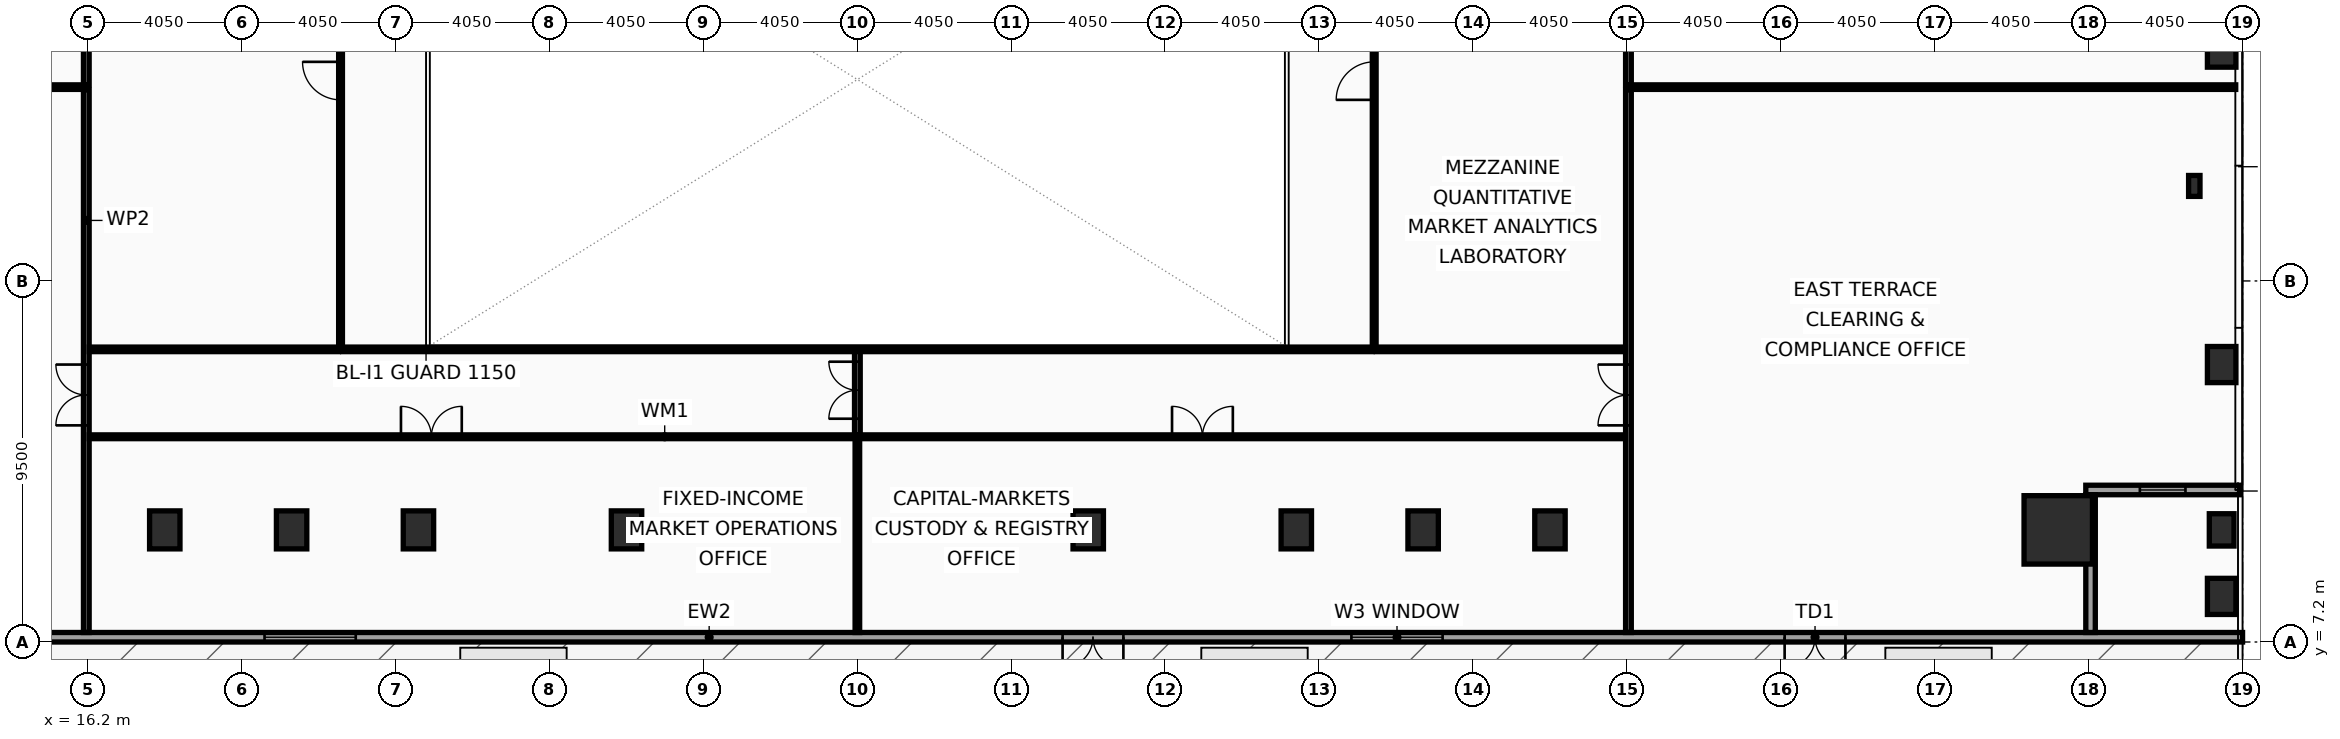
"""IFC4 building model, lengths in metres.
Left out: names, types, materials, properties, quantities, classifications, styles, units other than length and angle.
Written with IfcOpenShell. Run it as: python <this file> out.ifc"""

import sys

from ifc_helpers import new_model, si_unit, direction, frame, frame_2d, origin, origin_2d, place, context, subcontext, project, spatial, rectangle, hollow_rectangle, i_section, extrude, element, fill, save


model = new_model("IFC4")
c1 = context("Model", 3, precision=1e-05, world=origin(), true_north=direction((0.0, 1.0)))
c2 = subcontext(c1, "Body", "Model", "MODEL_VIEW")
j1 = project(units=[si_unit("LENGTHUNIT", "METRE"), si_unit("PLANEANGLEUNIT", "RADIAN")], contexts=[c1])
p1 = place(None, origin())
s1 = spatial("IfcSite", under=j1, at=p1, CompositionType="ELEMENT")
p2 = place(p1, origin())
s2 = spatial("IfcBuilding", under=s1, at=p2, CompositionType="ELEMENT")
p3 = place(p2, frame((0.0, 0.0, 15.4)))
s3 = spatial("IfcBuildingStorey", under=s2, at=p3, CompositionType="ELEMENT", Elevation=15.4)
p4 = place(p3, frame((68.05, 10.15, 0.0), z_axis=(0.0, 0.0, 1.0), x_axis=(1.0, 0.0, 0.0)))
e1 = element("IfcColumn", 1, at=p4, inside=s3, PredefinedType="COLUMN", context=c2, shape_type="SweptSolid", body=[
    extrude(hollow_rectangle(XDim=1.8, YDim=1.8, WallThickness=0.08, at=origin_2d()), origin(), (0.0, 0.0, 1.0), 5.0),
])
for number, where, z_axis, x_axis in (
    (2, (18.225, 10.15, 0.0), (0.0, 0.0, 1.0), (1.0, 0.0, 0.0)),
    (3, (21.562, 10.15, 0.0), (0.0, 0.0, 1.0), (1.0, 0.0, 0.0)),
    (4, (24.9, 10.15, 0.0), (0.0, 0.0, 1.0), (1.0, 0.0, 0.0)),
    (5, (30.375, 10.15, 0.0), (0.0, 0.0, 1.0), (1.0, 0.0, 0.0)),
    (6, (42.525, 10.15, 0.0), (0.0, 0.0, 1.0), (1.0, 0.0, 0.0)),
    (7, (48.0, 10.15, 0.0), (0.0, 0.0, 1.0), (1.0, 0.0, 0.0)),
    (8, (51.337, 10.15, 0.0), (0.0, 0.0, 1.0), (1.0, 0.0, 0.0)),
    (9, (54.675, 10.15, 0.0), (0.0, 0.0, 1.0), (1.0, 0.0, 0.0)),
):
    element("IfcColumn", number, at=place(p3, frame(where, z_axis=z_axis, x_axis=x_axis)), inside=s3, PredefinedType="COLUMN", context=c2, shape_type="SweptSolid", body=[
        extrude(hollow_rectangle(XDim=0.8, YDim=1.0, WallThickness=0.055, at=origin_2d()), origin(), (0.0, 0.0, 1.0), 5.0),
    ])
p5 = place(p3, frame((71.63, 19.2, 0.0), z_axis=(0.0, 0.0, 1.0), x_axis=(1.0, 0.0, 0.0)))
e10 = element("IfcColumn", 10, at=p5, inside=s3, PredefinedType="COLUMN", context=c2, shape_type="SweptSolid", body=[
    extrude(i_section(OverallWidth=0.3, OverallDepth=0.55, WebThickness=0.015, FlangeThickness=0.029, at=origin_2d()), origin(), (0.0, 0.0, 1.0), 5.0),
])
p6 = place(p3, frame((72.35, 8.4, 0.0), z_axis=(0.0, 0.0, 1.0), x_axis=(1.0, 0.0, 0.0)))
e11 = element("IfcColumn", 11, at=p6, inside=s3, PredefinedType="PILASTER", context=c2, shape_type="SweptSolid", body=[
    extrude(rectangle(XDim=0.75, YDim=0.95, at=origin_2d()), origin(), (0.0, 0.0, 1.0), 5.0),
])
p7 = place(p3, frame((72.35, 10.15, 0.0), z_axis=(0.0, 0.0, 1.0), x_axis=(1.0, 0.0, 0.0)))
e12 = element("IfcColumn", 12, at=p7, inside=s3, PredefinedType="PILASTER", context=c2, shape_type="SweptSolid", body=[
    extrude(rectangle(XDim=0.65, YDim=0.85, at=origin_2d()), origin(), (0.0, 0.0, 1.0), 5.0),
])
for number, where, z_axis, x_axis in (
    (13, (72.35, 14.5, 0.0), (0.0, 0.0, 1.0), (1.0, 0.0, 0.0)),
    (14, (72.35, 22.8, 0.0), (0.0, 0.0, 1.0), (1.0, 0.0, 0.0)),
):
    element("IfcColumn", number, at=place(p3, frame(where, z_axis=z_axis, x_axis=x_axis)), inside=s3, PredefinedType="PILASTER", context=c2, shape_type="SweptSolid", body=[
        extrude(rectangle(XDim=0.75, YDim=0.95, at=origin_2d()), origin(), (0.0, 0.0, 1.0), 5.0),
    ])
p8 = place(p3, frame((72.9, 7.325, 0.0), z_axis=(0.0, 0.0, 1.0), x_axis=(-1.0, 0.0, 0.0)))
e15 = element("IfcWall", 15, at=p8, inside=s3, PredefinedType="SOLIDWALL", context=c2, shape_type="SweptSolid", body=[
    extrude(rectangle(XDim=72.9, YDim=0.25, at=frame_2d((36.45, 0.0))), origin(), (0.0, 0.0, 1.0), 3.87),
])
p9 = place(p8, frame((10.45, 0.0, 0.0)))
e16 = element("IfcOpeningElement", 16, at=p9, cuts=e15, PredefinedType="OPENING", context=c2, shape_type="SweptSolid", body=[
    extrude(rectangle(XDim=1.6, YDim=2.2, at=frame_2d((0.8, 1.1))), frame((0.0, 0.135, 0.0), z_axis=(0.0, -1.0, 0.0), x_axis=(1.0, 0.0, 0.0)), (0.0, 0.0, 1.0), 0.27),
])
p10 = place(p8, frame((29.45, 0.0, 0.0)))
e17 = element("IfcOpeningElement", 17, at=p10, cuts=e15, PredefinedType="OPENING", context=c2, shape_type="SweptSolid", body=[
    extrude(rectangle(XDim=1.6, YDim=2.2, at=frame_2d((0.8, 1.1))), frame((0.0, 0.135, 0.0), z_axis=(0.0, -1.0, 0.0), x_axis=(1.0, 0.0, 0.0)), (0.0, 0.0, 1.0), 0.27),
])
p11 = place(p8, frame((60.65, 0.0, 0.0)))
e18 = element("IfcOpeningElement", 18, at=p11, cuts=e15, PredefinedType="OPENING", context=c2, shape_type="SweptSolid", body=[
    extrude(rectangle(XDim=1.05, YDim=2.15, at=frame_2d((0.525, 1.075))), frame((0.0, 0.135, 0.0), z_axis=(0.0, -1.0, 0.0), x_axis=(1.0, 0.0, 0.0)), (0.0, 0.0, 1.0), 0.27),
])
p12 = place(p8, frame((21.05, 0.0, 0.85)))
e19 = element("IfcOpeningElement", 19, at=p12, cuts=e15, PredefinedType="OPENING", context=c2, shape_type="SweptSolid", body=[
    extrude(rectangle(XDim=2.4, YDim=2.6, at=frame_2d((1.2, 1.3))), frame((0.0, 0.135, 0.0), z_axis=(0.0, -1.0, 0.0), x_axis=(1.0, 0.0, 0.0)), (0.0, 0.0, 1.0), 0.27),
])
p13 = place(p8, frame((49.65, 0.0, 0.85)))
e20 = element("IfcOpeningElement", 20, at=p13, cuts=e15, PredefinedType="OPENING", context=c2, shape_type="SweptSolid", body=[
    extrude(rectangle(XDim=2.4, YDim=2.6, at=frame_2d((1.2, 1.3))), frame((0.0, 0.135, 0.0), z_axis=(0.0, -1.0, 0.0), x_axis=(1.0, 0.0, 0.0)), (0.0, 0.0, 1.0), 0.27),
])
p14 = place(p3, frame((72.82, 11.2, 0.0), z_axis=(0.0, 0.0, 1.0), x_axis=(-1.0, 0.0, 0.0)))
e21 = element("IfcWall", 21, at=p14, inside=s3, PredefinedType="SOLIDWALL", context=c2, shape_type="SweptSolid", body=[
    extrude(rectangle(XDim=4.045, YDim=0.25, at=frame_2d((2.022, 0.0))), origin(), (0.0, 0.0, 1.0), 4.12),
])
p15 = place(p14, frame((1.423, 0.0, 0.9)))
e22 = element("IfcOpeningElement", 22, at=p15, cuts=e21, PredefinedType="OPENING", context=c2, shape_type="SweptSolid", body=[
    extrude(rectangle(XDim=1.2, YDim=2.8, at=frame_2d((0.6, 1.4))), frame((0.0, 0.135, 0.0), z_axis=(0.0, -1.0, 0.0), x_axis=(1.0, 0.0, 0.0)), (0.0, 0.0, 1.0), 0.27),
])
p16 = place(p3, frame((68.9, 11.075, 0.0), z_axis=(0.0, 0.0, 1.0), x_axis=(0.0, -1.0, 0.0)))
e23 = element("IfcWall", 23, at=p16, inside=s3, PredefinedType="SOLIDWALL", context=c2, shape_type="SweptSolid", body=[
    extrude(rectangle(XDim=3.625, YDim=0.25, at=frame_2d((1.812, 0.0))), origin(), (0.0, 0.0, 1.0), 4.12),
])
p17 = place(p3, frame((16.16, 7.45, 0.0), z_axis=(0.0, 0.0, 1.0), x_axis=(0.0, 1.0, 0.0)))
e24 = element("IfcWall", 24, at=p17, inside=s3, PredefinedType="PARTITIONING", context=c2, shape_type="SweptSolid", body=[
    extrude(rectangle(XDim=14.285, YDim=0.15, at=frame_2d((7.143, 0.0))), origin(), (0.0, 0.0, 1.0), 3.87),
])
p18 = place(p17, frame((5.45, 0.0, 0.0)))
e25 = element("IfcOpeningElement", 25, at=p18, cuts=e24, PredefinedType="OPENING", context=c2, shape_type="SweptSolid", body=[
    extrude(rectangle(XDim=1.6, YDim=2.15, at=frame_2d((0.8, 1.075))), frame((0.0, 0.085, 0.0), z_axis=(0.0, -1.0, 0.0), x_axis=(1.0, 0.0, 0.0)), (0.0, 0.0, 1.0), 0.17),
])
p19 = place(p3, frame((16.16, 21.865, 0.0), z_axis=(0.0, 0.0, 1.0), x_axis=(0.0, 1.0, 0.0)))
e26 = element("IfcWall", 26, at=p19, inside=s3, PredefinedType="PARTITIONING", context=c2, shape_type="SweptSolid", body=[
    extrude(rectangle(XDim=13.77, YDim=0.15, at=frame_2d((6.885, 0.0))), origin(), (0.0, 0.0, 1.0), 3.87),
])
p20 = place(p19, frame((5.2, 0.0, 0.0)))
e27 = element("IfcOpeningElement", 27, at=p20, cuts=e26, PredefinedType="OPENING", context=c2, shape_type="SweptSolid", body=[
    extrude(rectangle(XDim=1.0, YDim=2.05, at=frame_2d((0.5, 1.025))), frame((0.0, 0.085, 0.0), z_axis=(0.0, -1.0, 0.0), x_axis=(1.0, 0.0, 0.0)), (0.0, 0.0, 1.0), 0.17),
])
p21 = place(p3, frame((0.18, 21.8, 0.0), z_axis=(0.0, 0.0, 1.0), x_axis=(1.0, 0.0, 0.0)))
e28 = element("IfcWall", 28, at=p21, inside=s3, PredefinedType="PARTITIONING", context=c2, shape_type="SweptSolid", body=[
    extrude(rectangle(XDim=15.9, YDim=0.12, at=frame_2d((7.95, 0.0))), origin(), (0.0, 0.0, 1.0), 4.12),
])
p22 = place(p3, frame((56.74, 7.45, 0.0), z_axis=(0.0, 0.0, 1.0), x_axis=(0.0, 1.0, 0.0)))
e29 = element("IfcWall", 29, at=p22, inside=s3, PredefinedType="PARTITIONING", context=c2, shape_type="SweptSolid", body=[
    extrude(rectangle(XDim=14.285, YDim=0.15, at=frame_2d((7.143, 0.0))), origin(), (0.0, 0.0, 1.0), 3.87),
])
p23 = place(p22, frame((5.45, 0.0, 0.0)))
e30 = element("IfcOpeningElement", 30, at=p23, cuts=e29, PredefinedType="OPENING", context=c2, shape_type="SweptSolid", body=[
    extrude(rectangle(XDim=1.6, YDim=2.15, at=frame_2d((0.8, 1.075))), frame((0.0, 0.085, 0.0), z_axis=(0.0, -1.0, 0.0), x_axis=(1.0, 0.0, 0.0)), (0.0, 0.0, 1.0), 0.17),
])
p24 = place(p3, frame((56.74, 21.865, 0.0), z_axis=(0.0, 0.0, 1.0), x_axis=(0.0, 1.0, 0.0)))
e31 = element("IfcWall", 31, at=p24, inside=s3, PredefinedType="PARTITIONING", context=c2, shape_type="SweptSolid", body=[
    extrude(rectangle(XDim=13.77, YDim=0.15, at=frame_2d((6.885, 0.0))), origin(), (0.0, 0.0, 1.0), 3.87),
])
p25 = place(p24, frame((5.2, 0.0, 0.0)))
e32 = element("IfcOpeningElement", 32, at=p25, cuts=e31, PredefinedType="OPENING", context=c2, shape_type="SweptSolid", body=[
    extrude(rectangle(XDim=1.0, YDim=2.05, at=frame_2d((0.5, 1.025))), frame((0.0, 0.085, 0.0), z_axis=(0.0, -1.0, 0.0), x_axis=(1.0, 0.0, 0.0)), (0.0, 0.0, 1.0), 0.17),
])
p26 = place(p3, frame((56.82, 21.8, 0.0), z_axis=(0.0, 0.0, 1.0), x_axis=(1.0, 0.0, 0.0)))
e33 = element("IfcWall", 33, at=p26, inside=s3, PredefinedType="PARTITIONING", context=c2, shape_type="SweptSolid", body=[
    extrude(rectangle(XDim=15.9, YDim=0.12, at=frame_2d((7.95, 0.0))), origin(), (0.0, 0.0, 1.0), 4.12),
])
p27 = place(p3, frame((16.24, 12.6, 0.0), z_axis=(0.0, 0.0, 1.0), x_axis=(1.0, 0.0, 0.0)))
e34 = element("IfcWall", 34, at=p27, inside=s3, PredefinedType="MOVABLE", context=c2, shape_type="SweptSolid", body=[
    extrude(rectangle(XDim=20.13, YDim=0.1, at=frame_2d((10.065, 0.0))), origin(), (0.0, 0.0, 1.0), 3.87),
])
p28 = place(p27, frame((8.2, 0.0, 0.0)))
e35 = element("IfcOpeningElement", 35, at=p28, cuts=e34, PredefinedType="OPENING", context=c2, shape_type="SweptSolid", body=[
    extrude(rectangle(XDim=1.6, YDim=2.15, at=frame_2d((0.8, 1.075))), frame((0.0, 0.06, 0.0), z_axis=(0.0, -1.0, 0.0), x_axis=(1.0, 0.0, 0.0)), (0.0, 0.0, 1.0), 0.12),
])
p29 = place(p3, frame((36.53, 12.6, 0.0), z_axis=(0.0, 0.0, 1.0), x_axis=(1.0, 0.0, 0.0)))
e36 = element("IfcWall", 36, at=p29, inside=s3, PredefinedType="MOVABLE", context=c2, shape_type="SweptSolid", body=[
    extrude(rectangle(XDim=20.13, YDim=0.1, at=frame_2d((10.065, 0.0))), origin(), (0.0, 0.0, 1.0), 3.87),
])
p30 = place(p29, frame((8.2, 0.0, 0.0)))
e37 = element("IfcOpeningElement", 37, at=p30, cuts=e36, PredefinedType="OPENING", context=c2, shape_type="SweptSolid", body=[
    extrude(rectangle(XDim=1.6, YDim=2.15, at=frame_2d((0.8, 1.075))), frame((0.0, 0.06, 0.0), z_axis=(0.0, -1.0, 0.0), x_axis=(1.0, 0.0, 0.0)), (0.0, 0.0, 1.0), 0.12),
])
p31 = place(p3, frame((36.45, 7.45, 0.0), z_axis=(0.0, 0.0, 1.0), x_axis=(0.0, 1.0, 0.0)))
e38 = element("IfcWall", 38, at=p31, inside=s3, PredefinedType="PARTITIONING", context=c2, shape_type="SweptSolid", body=[
    extrude(rectangle(XDim=5.095, YDim=0.12, at=frame_2d((2.547, 0.0))), origin(), (0.0, 0.0, 1.0), 4.12),
])
p32 = place(p3, frame((22.85, 14.965, 0.0), z_axis=(0.0, 0.0, 1.0), x_axis=(0.0, 1.0, 0.0)))
e39 = element("IfcWall", 39, at=p32, inside=s3, PredefinedType="MOVABLE", context=c2, shape_type="SweptSolid", body=[
    extrude(rectangle(XDim=20.67, YDim=0.1, at=frame_2d((10.335, 0.0))), origin(), (0.0, 0.0, 1.0), 4.17),
])
p33 = place(p32, frame((6.5, 0.0, 0.0)))
e40 = element("IfcOpeningElement", 40, at=p33, cuts=e39, PredefinedType="OPENING", context=c2, shape_type="SweptSolid", body=[
    extrude(rectangle(XDim=1.0, YDim=2.05, at=frame_2d((0.5, 1.025))), frame((0.0, 0.06, 0.0), z_axis=(0.0, -1.0, 0.0), x_axis=(1.0, 0.0, 0.0)), (0.0, 0.0, 1.0), 0.12),
])
p34 = place(p3, frame((16.24, 14.9, 0.0), z_axis=(0.0, 0.0, 1.0), x_axis=(1.0, 0.0, 0.0)))
e41 = element("IfcWall", 41, at=p34, inside=s3, PredefinedType="PARTITIONING", context=c2, shape_type="SweptSolid", body=[
    extrude(rectangle(XDim=6.555, YDim=0.12, at=frame_2d((3.277, 0.0))), origin(), (0.0, 0.0, 1.0), 3.87),
])
p35 = place(p3, frame((50.05, 14.965, 0.0), z_axis=(0.0, 0.0, 1.0), x_axis=(0.0, 1.0, 0.0)))
e42 = element("IfcWall", 42, at=p35, inside=s3, PredefinedType="MOVABLE", context=c2, shape_type="SweptSolid", body=[
    extrude(rectangle(XDim=20.67, YDim=0.1, at=frame_2d((10.335, 0.0))), origin(), (0.0, 0.0, 1.0), 4.17),
])
p36 = place(p35, frame((6.5, 0.0, 0.0)))
e43 = element("IfcOpeningElement", 43, at=p36, cuts=e42, PredefinedType="OPENING", context=c2, shape_type="SweptSolid", body=[
    extrude(rectangle(XDim=1.0, YDim=2.05, at=frame_2d((0.5, 1.025))), frame((0.0, 0.06, 0.0), z_axis=(0.0, -1.0, 0.0), x_axis=(1.0, 0.0, 0.0)), (0.0, 0.0, 1.0), 0.12),
])
p37 = place(p3, frame((50.105, 14.9, 0.0), z_axis=(0.0, 0.0, 1.0), x_axis=(1.0, 0.0, 0.0)))
e44 = element("IfcWall", 44, at=p37, inside=s3, PredefinedType="PARTITIONING", context=c2, shape_type="SweptSolid", body=[
    extrude(rectangle(XDim=6.555, YDim=0.12, at=frame_2d((3.277, 0.0))), origin(), (0.0, 0.0, 1.0), 3.87),
])
p38 = place(p3, frame((36.45, 12.655, 0.0), z_axis=(0.0, 0.0, 1.0), x_axis=(0.0, 1.0, 0.0)))
e45 = element("IfcWall", 45, at=p38, inside=s3, PredefinedType="PARTITIONING", context=c2, shape_type="SweptSolid", body=[
    extrude(rectangle(XDim=2.28, YDim=0.15, at=frame_2d((1.14, 0.0))), origin(), (0.0, 0.0, 1.0), 4.17),
])
p39 = place(p38, frame((0.42, 0.0, 0.0)))
e46 = element("IfcOpeningElement", 46, at=p39, cuts=e45, PredefinedType="OPENING", context=c2, shape_type="SweptSolid", body=[
    extrude(rectangle(XDim=1.5, YDim=2.15, at=frame_2d((0.75, 1.075))), frame((0.0, 0.085, 0.0), z_axis=(0.0, -1.0, 0.0), x_axis=(1.0, 0.0, 0.0)), (0.0, 0.0, 1.0), 0.17),
])
p40 = place(p3, frame((22.905, 14.9, 0.0), z_axis=(0.0, 0.0, 1.0), x_axis=(1.0, 0.0, 0.0)))
e47 = element("IfcWall", 47, at=p40, inside=s3, PredefinedType="PARTITIONING", context=c2, shape_type="SweptSolid", body=[
    extrude(rectangle(XDim=27.09, YDim=0.12, at=frame_2d((13.545, 0.0))), origin(), (0.0, 0.0, 1.0), 3.87),
])
p41 = place(p9, origin())
e48 = element("IfcDoor", 48, at=p41, inside=s3, OperationType="DOUBLE_DOOR_SINGLE_SWING", PredefinedType="DOOR", context=c2, shape_type="SweptSolid", body=[
    extrude(rectangle(XDim=1.6, YDim=2.2, at=frame_2d((0.8, 1.1))), frame((0.0, 0.025, 0.0), z_axis=(0.0, -1.0, 0.0), x_axis=(1.0, 0.0, 0.0)), (0.0, 0.0, 1.0), 0.05),
])
fill(e16, e48)
p42 = place(p10, origin())
e49 = element("IfcDoor", 49, at=p42, inside=s3, OperationType="DOUBLE_DOOR_SINGLE_SWING", PredefinedType="DOOR", context=c2, shape_type="SweptSolid", body=[
    extrude(rectangle(XDim=1.6, YDim=2.2, at=frame_2d((0.8, 1.1))), frame((0.0, 0.025, 0.0), z_axis=(0.0, -1.0, 0.0), x_axis=(1.0, 0.0, 0.0)), (0.0, 0.0, 1.0), 0.05),
])
fill(e17, e49)
p43 = place(p12, origin())
e50 = element("IfcWindow", 50, at=p43, inside=s3, PartitioningType="SINGLE_PANEL", PredefinedType="WINDOW", context=c2, shape_type="SweptSolid", body=[
    extrude(rectangle(XDim=2.4, YDim=2.6, at=frame_2d((1.2, 1.3))), frame((0.0, 0.03, 0.0), z_axis=(0.0, -1.0, 0.0), x_axis=(1.0, 0.0, 0.0)), (0.0, 0.0, 1.0), 0.06),
])
fill(e19, e50)
p44 = place(p13, origin())
e51 = element("IfcWindow", 51, at=p44, inside=s3, PartitioningType="SINGLE_PANEL", PredefinedType="WINDOW", context=c2, shape_type="SweptSolid", body=[
    extrude(rectangle(XDim=2.4, YDim=2.6, at=frame_2d((1.2, 1.3))), frame((0.0, 0.03, 0.0), z_axis=(0.0, -1.0, 0.0), x_axis=(1.0, 0.0, 0.0)), (0.0, 0.0, 1.0), 0.06),
])
fill(e20, e51)
p45 = place(p15, origin())
e52 = element("IfcWindow", 52, at=p45, inside=s3, PartitioningType="SINGLE_PANEL", PredefinedType="WINDOW", context=c2, shape_type="SweptSolid", body=[
    extrude(rectangle(XDim=1.2, YDim=2.8, at=frame_2d((0.6, 1.4))), frame((0.0, 0.03, 0.0), z_axis=(0.0, -1.0, 0.0), x_axis=(1.0, 0.0, 0.0)), (0.0, 0.0, 1.0), 0.06),
])
fill(e22, e52)
p46 = place(p18, origin())
e53 = element("IfcDoor", 53, at=p46, inside=s3, OperationType="DOUBLE_DOOR_SINGLE_SWING", PredefinedType="DOOR", context=c2, shape_type="SweptSolid", body=[
    extrude(rectangle(XDim=1.6, YDim=2.15, at=frame_2d((0.8, 1.075))), frame((0.0, 0.025, 0.0), z_axis=(0.0, -1.0, 0.0), x_axis=(1.0, 0.0, 0.0)), (0.0, 0.0, 1.0), 0.05),
])
fill(e25, e53)
p47 = place(p23, origin())
e54 = element("IfcDoor", 54, at=p47, inside=s3, OperationType="DOUBLE_DOOR_SINGLE_SWING", PredefinedType="DOOR", context=c2, shape_type="SweptSolid", body=[
    extrude(rectangle(XDim=1.6, YDim=2.15, at=frame_2d((0.8, 1.075))), frame((0.0, 0.025, 0.0), z_axis=(0.0, -1.0, 0.0), x_axis=(1.0, 0.0, 0.0)), (0.0, 0.0, 1.0), 0.05),
])
fill(e30, e54)
p48 = place(p28, origin())
e55 = element("IfcDoor", 55, at=p48, inside=s3, OperationType="DOUBLE_DOOR_SINGLE_SWING", PredefinedType="DOOR", context=c2, shape_type="SweptSolid", body=[
    extrude(rectangle(XDim=1.6, YDim=2.15, at=frame_2d((0.8, 1.075))), frame((0.0, 0.025, 0.0), z_axis=(0.0, -1.0, 0.0), x_axis=(1.0, 0.0, 0.0)), (0.0, 0.0, 1.0), 0.05),
])
fill(e35, e55)
p49 = place(p30, origin())
e56 = element("IfcDoor", 56, at=p49, inside=s3, OperationType="DOUBLE_DOOR_SINGLE_SWING", PredefinedType="DOOR", context=c2, shape_type="SweptSolid", body=[
    extrude(rectangle(XDim=1.6, YDim=2.15, at=frame_2d((0.8, 1.075))), frame((0.0, 0.025, 0.0), z_axis=(0.0, -1.0, 0.0), x_axis=(1.0, 0.0, 0.0)), (0.0, 0.0, 1.0), 0.05),
])
fill(e37, e56)
p50 = place(p33, origin())
e57 = element("IfcDoor", 57, at=p50, inside=s3, OperationType="SINGLE_SWING_RIGHT", PredefinedType="DOOR", context=c2, shape_type="SweptSolid", body=[
    extrude(rectangle(XDim=1.0, YDim=2.05, at=frame_2d((0.5, 1.025))), frame((0.0, 0.025, 0.0), z_axis=(0.0, -1.0, 0.0), x_axis=(1.0, 0.0, 0.0)), (0.0, 0.0, 1.0), 0.05),
])
fill(e40, e57)
p51 = place(p36, origin())
e58 = element("IfcDoor", 58, at=p51, inside=s3, OperationType="SINGLE_SWING_LEFT", PredefinedType="DOOR", context=c2, shape_type="SweptSolid", body=[
    extrude(rectangle(XDim=1.0, YDim=2.05, at=frame_2d((0.5, 1.025))), frame((0.0, 0.025, 0.0), z_axis=(0.0, -1.0, 0.0), x_axis=(1.0, 0.0, 0.0)), (0.0, 0.0, 1.0), 0.05),
])
fill(e43, e58)
p52 = place(p39, origin())
e59 = element("IfcDoor", 59, at=p52, inside=s3, OperationType="DOUBLE_DOOR_SINGLE_SWING", PredefinedType="DOOR", context=c2, shape_type="SweptSolid", body=[
    extrude(rectangle(XDim=1.5, YDim=2.15, at=frame_2d((0.75, 1.075))), frame((0.0, 0.025, 0.0), z_axis=(0.0, -1.0, 0.0), x_axis=(1.0, 0.0, 0.0)), (0.0, 0.0, 1.0), 0.05),
])
fill(e46, e59)
save(model, sys.argv[1])
